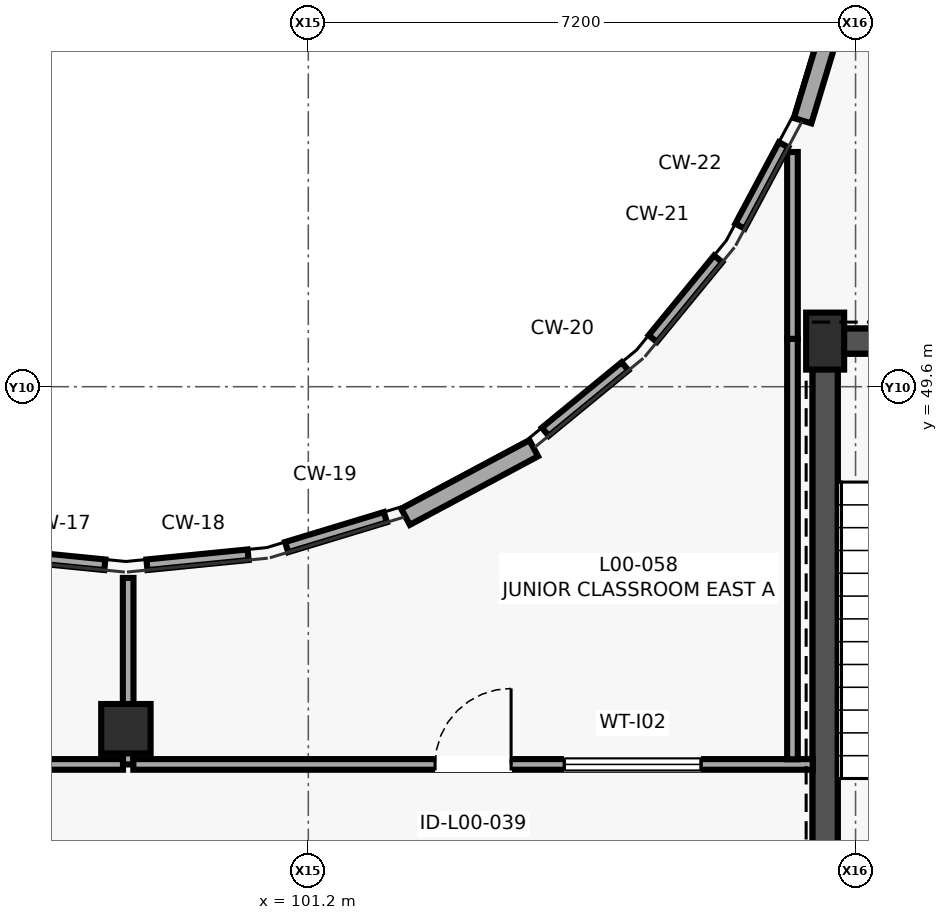
"""IFC4 building model, lengths in metres.
Left out: names, types, materials, properties, quantities, classifications, styles, units other than length and angle.
Written with IfcOpenShell. Run it as: python <this file> out.ifc"""

import sys

from ifc_helpers import new_model, si_unit, direction, frame, frame_2d, origin, origin_2d, place, context, subcontext, project, spatial, rectangle, circle, extrude, element, fill, save


model = new_model("IFC4")
c1 = context("Model", 3, precision=1e-05, world=origin(), true_north=direction((0.0, 1.0)))
c2 = subcontext(c1, "Body", "Model", "MODEL_VIEW")
j1 = project(units=[si_unit("LENGTHUNIT", "METRE"), si_unit("PLANEANGLEUNIT", "RADIAN")], contexts=[c1])
p1 = place(None, origin())
s1 = spatial("IfcSite", under=j1, at=p1, CompositionType="ELEMENT")
p2 = place(p1, origin())
s2 = spatial("IfcBuilding", under=s1, at=p2, CompositionType="ELEMENT")
p3 = place(p2, origin())
s3 = spatial("IfcBuildingStorey", under=s2, at=p3, CompositionType="ELEMENT", Elevation=0.0)
p4 = place(p3, frame((108.0, 42.565, -1.85), z_axis=(0.0, 0.0, 1.0), x_axis=(0.0, 1.0, 0.0)))
e1 = element("IfcWall", 1, at=p4, inside=s3, PredefinedType="SHEAR", context=c2, shape_type="SweptSolid", body=[
    extrude(rectangle(XDim=7.47, YDim=0.33, at=frame_2d((3.735, 0.0))), origin(), (0.0, 0.0, 1.0), 1.6),
])
p5 = place(p3, frame((107.835, 50.2, -1.85), z_axis=(0.0, 0.0, 1.0), x_axis=(1.0, 0.0, 0.0)))
e2 = element("IfcWall", 2, at=p5, inside=s3, PredefinedType="SHEAR", context=c2, shape_type="SweptSolid", body=[
    extrude(rectangle(XDim=3.865, YDim=0.33, at=frame_2d((1.933, 0.0))), origin(), (0.0, 0.0, 1.0), 1.6),
])
p6 = place(p3, frame((98.8, 45.1, 0.0), z_axis=(0.0, 0.0, 1.0), x_axis=(1.0, 0.0, 0.0)))
e3 = element("IfcColumn", 3, at=p6, inside=s3, PredefinedType="COLUMN", context=c2, shape_type="SweptSolid", body=[
    extrude(circle(Radius=0.325, at=origin_2d()), origin(), (0.0, 0.0, 1.0), 4.2),
])
p7 = place(p3, frame((108.0, 50.2, 0.0), z_axis=(0.0, 0.0, 1.0), x_axis=(1.0, 0.0, 0.0)))
e4 = element("IfcColumn", 4, at=p7, inside=s3, PredefinedType="COLUMN", context=c2, shape_type="SweptSolid", body=[
    extrude(rectangle(XDim=0.5, YDim=0.75, at=origin_2d()), origin(), (0.0, 0.0, 1.0), 4.2),
])
p8 = place(p3, frame((102.479, 47.888, 0.0), z_axis=(0.0, 0.0, 1.0), x_axis=(0.881840180227, 0.471548403175, 0.0)))
e5 = element("IfcWall", 5, at=p8, inside=s3, PredefinedType="SOLIDWALL", context=c2, shape_type="SweptSolid", body=[
    extrude(rectangle(XDim=1.913, YDim=0.24, at=frame_2d((0.957, 0.0))), origin(), (0.0, 0.0, 1.0), 3.98),
])
p9 = place(p3, frame((107.704, 53.1, 0.0), z_axis=(0.0, 0.0, 1.0), x_axis=(0.289748657608, 0.957102771605, 0.0)))
e6 = element("IfcWall", 6, at=p9, inside=s3, PredefinedType="SOLIDWALL", context=c2, shape_type="SweptSolid", body=[
    extrude(rectangle(XDim=1.912, YDim=0.24, at=frame_2d((0.956, 0.0))), origin(), (0.0, 0.0, 1.0), 3.98),
])
p10 = place(p3, frame((107.835, 50.2, 0.0), z_axis=(0.0, 0.0, 1.0), x_axis=(1.0, 0.0, 0.0)))
e7 = element("IfcWall", 7, at=p10, inside=s3, PredefinedType="SHEAR", context=c2, shape_type="SweptSolid", body=[
    extrude(rectangle(XDim=7.53, YDim=0.33, at=frame_2d((3.765, 0.0))), origin(), (0.0, 0.0, 1.0), 3.98),
])
p11 = place(p10, frame((5.015, 0.0, 0.0)))
e8 = element("IfcOpeningElement", 8, at=p11, cuts=e7, PredefinedType="OPENING", context=c2, shape_type="SweptSolid", body=[
    extrude(rectangle(XDim=1.05, YDim=2.15, at=frame_2d((0.525, 1.075))), frame((0.0, 0.175, 0.0), z_axis=(0.0, -1.0, 0.0), x_axis=(1.0, 0.0, 0.0)), (0.0, 0.0, 1.0), 0.35),
])
p12 = place(p10, frame((1.565, 0.0, 0.0)))
e9 = element("IfcOpeningElement", 9, at=p12, cuts=e7, PredefinedType="OPENING", context=c2, shape_type="SweptSolid", body=[
    extrude(rectangle(XDim=1.2, YDim=2.2, at=frame_2d((0.6, 1.1))), frame((0.0, 0.175, 0.0), z_axis=(0.0, -1.0, 0.0), x_axis=(1.0, 0.0, 0.0)), (0.0, 0.0, 1.0), 0.35),
])
p13 = place(p3, frame((108.0, 42.565, 0.0), z_axis=(0.0, 0.0, 1.0), x_axis=(0.0, 1.0, 0.0)))
e10 = element("IfcWall", 10, at=p13, inside=s3, PredefinedType="SHEAR", context=c2, shape_type="SweptSolid", body=[
    extrude(rectangle(XDim=7.47, YDim=0.33, at=frame_2d((3.735, 0.0))), origin(), (0.0, 0.0, 1.0), 3.98),
])
p14 = place(p3, frame((100.408, 47.389, 0.0), z_axis=(0.0, 0.0, 1.0), x_axis=(-0.99513072014, -0.098563937798, 0.0)))
e11 = element("IfcWall", 11, at=p14, inside=s3, PredefinedType="PARTITIONING", context=c2, shape_type="SweptSolid", body=[
    extrude(rectangle(XDim=1.338, YDim=0.14, at=frame_2d((0.669, 0.0))), origin(), (0.0, 0.0, 1.0), 3.975),
])
p15 = place(p3, frame((98.83, 47.084, 0.0), z_axis=(0.0, 0.0, 1.0), x_axis=(0.0, -1.0, 0.0)))
e12 = element("IfcWall", 12, at=p15, inside=s3, PredefinedType="PARTITIONING", context=c2, shape_type="SweptSolid", body=[
    extrude(rectangle(XDim=2.454, YDim=0.14, at=frame_2d((1.227, 0.0))), origin(), (0.0, 0.0, 1.0), 3.975),
])
p16 = place(p3, frame((98.898, 44.63, 0.0), z_axis=(0.0, 0.0, 1.0), x_axis=(1.0, 0.0, 0.0)))
e13 = element("IfcWall", 13, at=p16, inside=s3, PredefinedType="PARTITIONING", context=c2, shape_type="SweptSolid", body=[
    extrude(rectangle(XDim=8.939, YDim=0.14, at=frame_2d((4.469, 0.0))), origin(), (0.0, 0.0, 1.0), 3.975),
])
p17 = place(p16, frame((3.97, 0.0, 0.0)))
e14 = element("IfcOpeningElement", 14, at=p17, cuts=e13, PredefinedType="OPENING", context=c2, shape_type="SweptSolid", body=[
    extrude(rectangle(XDim=1.0, YDim=2.1, at=frame_2d((0.5, 1.05))), frame((0.0, 0.08, 0.0), z_axis=(0.0, -1.0, 0.0), x_axis=(1.0, 0.0, 0.0)), (0.0, 0.0, 1.0), 0.16),
])
p18 = place(p16, frame((5.67, 0.0, 1.05)))
e15 = element("IfcOpeningElement", 15, at=p18, cuts=e13, PredefinedType="OPENING", context=c2, shape_type="SweptSolid", body=[
    extrude(rectangle(XDim=1.8, YDim=1.2, at=frame_2d((0.9, 0.6))), frame((0.0, 0.08, 0.0), z_axis=(0.0, -1.0, 0.0), x_axis=(1.0, 0.0, 0.0)), (0.0, 0.0, 1.0), 0.16),
])
p19 = place(p3, frame((107.57, 44.698, 0.0), z_axis=(0.0, 0.0, 1.0), x_axis=(0.0, 1.0, 0.0)))
e16 = element("IfcWall", 16, at=p19, inside=s3, PredefinedType="PARTITIONING", context=c2, shape_type="SweptSolid", body=[
    extrude(rectangle(XDim=5.532, YDim=0.14, at=frame_2d((2.766, 0.0))), origin(), (0.0, 0.0, 1.0), 3.975),
])
p20 = place(p3, frame((107.57, 50.23, 0.0), z_axis=(0.0, 0.0, 1.0), x_axis=(0.0, 1.0, 0.0)))
e17 = element("IfcWall", 17, at=p20, inside=s3, PredefinedType="PARTITIONING", context=c2, shape_type="SweptSolid", body=[
    extrude(rectangle(XDim=2.458, YDim=0.14, at=frame_2d((1.229, 0.0))), origin(), (0.0, 0.0, 1.0), 3.975),
])
p21 = place(p3, frame((107.453, 52.784, 0.0), z_axis=(0.0, 0.0, 1.0), x_axis=(-0.471390738411, -0.881924470542, 0.0)))
e18 = element("IfcWall", 18, at=p21, inside=s3, PredefinedType="PARTITIONING", context=c2, shape_type="SweptSolid", body=[
    extrude(rectangle(XDim=1.216, YDim=0.14, at=frame_2d((0.608, 0.0))), origin(), (0.0, 0.0, 1.0), 3.975),
])
p22 = place(p3, frame((106.593, 51.282, 0.0), z_axis=(0.0, 0.0, 1.0), x_axis=(-0.634451674201, -0.772962530207, 0.0)))
e19 = element("IfcWall", 19, at=p22, inside=s3, PredefinedType="PARTITIONING", context=c2, shape_type="SweptSolid", body=[
    extrude(rectangle(XDim=1.357, YDim=0.14, at=frame_2d((0.679, 0.0))), origin(), (0.0, 0.0, 1.0), 3.975),
])
p23 = place(p3, frame((105.367, 49.868, 0.0), z_axis=(0.0, 0.0, 1.0), x_axis=(-0.772978341916, -0.634432410055, 0.0)))
e20 = element("IfcWall", 20, at=p23, inside=s3, PredefinedType="PARTITIONING", context=c2, shape_type="SweptSolid", body=[
    extrude(rectangle(XDim=1.357, YDim=0.14, at=frame_2d((0.678, 0.0))), origin(), (0.0, 0.0, 1.0), 3.975),
])
p24 = place(p3, frame((102.214, 47.883, 0.0), z_axis=(0.0, 0.0, 1.0), x_axis=(-0.956945716193, -0.290266939661, 0.0)))
e21 = element("IfcWall", 21, at=p24, inside=s3, PredefinedType="PARTITIONING", context=c2, shape_type="SweptSolid", body=[
    extrude(rectangle(XDim=1.357, YDim=0.14, at=frame_2d((0.679, 0.0))), origin(), (0.0, 0.0, 1.0), 3.975),
])
p25 = place(p3, frame((88.03, 44.63, 0.0), z_axis=(0.0, 0.0, 1.0), x_axis=(1.0, 0.0, 0.0)))
e22 = element("IfcWall", 22, at=p25, inside=s3, PredefinedType="PARTITIONING", context=c2, shape_type="SweptSolid", body=[
    extrude(rectangle(XDim=10.732, YDim=0.14, at=frame_2d((5.366, 0.0))), origin(), (0.0, 0.0, 1.0), 3.975),
])
p26 = place(p25, frame((4.866, 0.0, 0.0)))
e23 = element("IfcOpeningElement", 23, at=p26, cuts=e22, PredefinedType="OPENING", context=c2, shape_type="SweptSolid", body=[
    extrude(rectangle(XDim=1.0, YDim=2.1, at=frame_2d((0.5, 1.05))), frame((0.0, 0.08, 0.0), z_axis=(0.0, -1.0, 0.0), x_axis=(1.0, 0.0, 0.0)), (0.0, 0.0, 1.0), 0.16),
])
p27 = place(p25, frame((6.566, 0.0, 1.05)))
e24 = element("IfcOpeningElement", 24, at=p27, cuts=e22, PredefinedType="OPENING", context=c2, shape_type="SweptSolid", body=[
    extrude(rectangle(XDim=1.6, YDim=1.1, at=frame_2d((0.8, 0.55))), frame((0.0, 0.08, 0.0), z_axis=(0.0, -1.0, 0.0), x_axis=(1.0, 0.0, 0.0)), (0.0, 0.0, 1.0), 0.16),
])
p28 = place(p3, frame((98.523, 47.257, 0.0), z_axis=(0.0, 0.0, 1.0), x_axis=(-0.99513072014, 0.098563937798, 0.0)))
e25 = element("IfcWall", 25, at=p28, inside=s3, PredefinedType="PARTITIONING", context=c2, shape_type="SweptSolid", body=[
    extrude(rectangle(XDim=1.338, YDim=0.14, at=frame_2d((0.669, 0.0))), origin(), (0.0, 0.0, 1.0), 3.975),
])
p29 = place(p17, origin())
e26 = element("IfcDoor", 26, at=p29, inside=s3, OperationType="SINGLE_SWING_RIGHT", PredefinedType="DOOR", context=c2, shape_type="SweptSolid", body=[
    extrude(rectangle(XDim=1.0, YDim=2.1, at=frame_2d((0.5, 1.05))), frame((0.0, 0.025, 0.0), z_axis=(0.0, -1.0, 0.0), x_axis=(1.0, 0.0, 0.0)), (0.0, 0.0, 1.0), 0.05),
])
fill(e14, e26)
p30 = place(p18, origin())
e27 = element("IfcWindow", 27, at=p30, inside=s3, PartitioningType="SINGLE_PANEL", PredefinedType="WINDOW", context=c2, shape_type="SweptSolid", body=[
    extrude(rectangle(XDim=1.8, YDim=1.2, at=frame_2d((0.9, 0.6))), frame((0.0, 0.03, 0.0), z_axis=(0.0, -1.0, 0.0), x_axis=(1.0, 0.0, 0.0)), (0.0, 0.0, 1.0), 0.06),
])
fill(e15, e27)
save(model, sys.argv[1])
